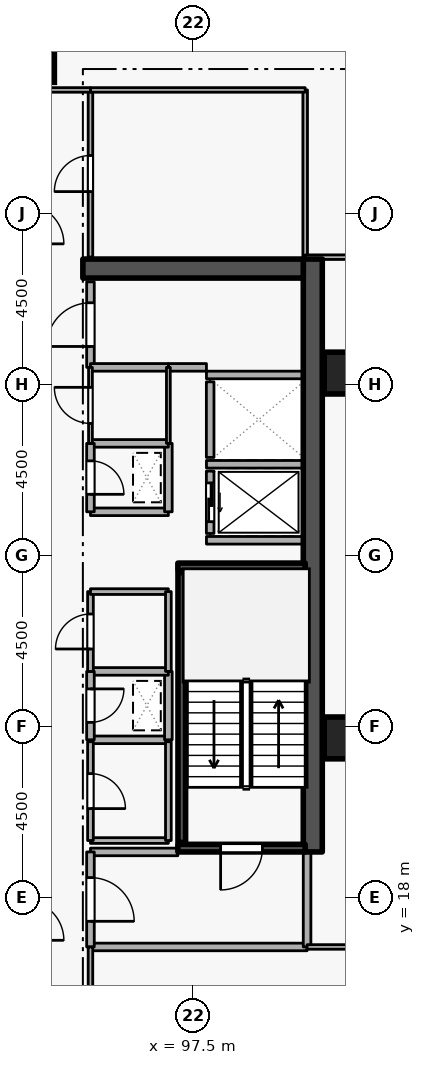
"""IFC4 building model, lengths in metres.
Left out: names, types, materials, properties, quantities, classifications, styles, units other than length and angle.
Written with IfcOpenShell. Run it as: python <this file> out.ifc"""

import sys

from ifc_helpers import new_model, si_unit, direction, frame, frame_2d, origin, origin_2d, place, context, subcontext, project, spatial, rectangle, extrude, element, fill, save


model = new_model("IFC4")
c1 = context("Model", 3, precision=1e-05, world=origin(), true_north=direction((0.0, 1.0)))
c2 = subcontext(c1, "Body", "Model", "MODEL_VIEW")
j1 = project(units=[si_unit("LENGTHUNIT", "METRE"), si_unit("PLANEANGLEUNIT", "RADIAN")], contexts=[c1])
p1 = place(None, origin())
s1 = spatial("IfcSite", under=j1, at=p1, CompositionType="ELEMENT")
p2 = place(p1, origin())
s2 = spatial("IfcBuilding", under=s1, at=p2, CompositionType="ELEMENT")
p3 = place(p2, frame((0.0, 0.0, 149.1)))
s3 = spatial("IfcBuildingStorey", under=s2, at=p3, CompositionType="ELEMENT", Elevation=149.1)
p4 = place(p3, frame((100.65, 19.2, 0.0), z_axis=(0.0, 0.0, 1.0), x_axis=(0.0, 1.0, 0.0)))
e1 = element("IfcWall", 1, at=p4, inside=s3, PredefinedType="SHEAR", context=c2, shape_type="SweptSolid", body=[
    extrude(rectangle(XDim=15.6, YDim=0.5, at=frame_2d((7.8, 0.0))), origin(), (0.0, 0.0, 1.0), 3.6),
])
p5 = place(p3, frame((94.6, 34.55, 0.0), z_axis=(0.0, 0.0, 1.0), x_axis=(1.0, 0.0, 0.0)))
e2 = element("IfcWall", 2, at=p5, inside=s3, PredefinedType="SHEAR", context=c2, shape_type="SweptSolid", body=[
    extrude(rectangle(XDim=5.8, YDim=0.5, at=frame_2d((2.9, 0.0))), origin(), (0.0, 0.0, 1.0), 3.6),
])
for number, where, z_axis, x_axis in (
    (3, (93.3, 40.0, 0.0), (0.0, 0.0, 1.0), (1.0, 0.0, 0.0)),
    (4, (101.5, 22.2, 0.0), (0.0, 0.0, 1.0), (1.0, 0.0, 0.0)),
    (5, (101.5, 31.8, 0.0), (0.0, 0.0, 1.0), (1.0, 0.0, 0.0)),
):
    element("IfcColumn", number, at=place(p3, frame(where, z_axis=z_axis, x_axis=x_axis)), inside=s3, PredefinedType="COLUMN", context=c2, shape_type="SweptSolid", body=[
        extrude(rectangle(XDim=1.1, YDim=1.1, at=origin_2d()), origin(), (0.0, 0.0, 1.0), 3.6),
    ])
p6 = place(p3, frame((97.95, 29.22, 0.0), z_axis=(0.0, 0.0, 1.0), x_axis=(0.0, -1.0, 0.0)))
e6 = element("IfcWall", 6, at=p6, inside=s3, PredefinedType="STANDARD", context=c2, shape_type="SweptSolid", body=[
    extrude(rectangle(XDim=1.64, YDim=0.2, at=frame_2d((0.82, 0.0))), origin(), (0.0, 0.0, 1.0), 3.3),
])
p7 = place(p6, frame((0.31, 0.0, 0.0)))
e7 = element("IfcOpeningElement", 7, at=p7, cuts=e6, PredefinedType="OPENING", context=c2, shape_type="SweptSolid", body=[
    extrude(rectangle(XDim=1.02, YDim=2.06, at=frame_2d((0.51, 1.03))), frame((0.0, 0.11, 0.0), z_axis=(0.0, -1.0, 0.0), x_axis=(1.0, 0.0, 0.0)), (0.0, 0.0, 1.0), 0.22),
])
p8 = place(p3, frame((97.95, 31.57, 0.0), z_axis=(0.0, 0.0, 1.0), x_axis=(0.0, -1.0, 0.0)))
e8 = element("IfcWall", 8, at=p8, inside=s3, PredefinedType="STANDARD", context=c2, shape_type="SweptSolid", body=[
    extrude(rectangle(XDim=1.99, YDim=0.2, at=frame_2d((0.995, 0.0))), origin(), (0.0, 0.0, 1.0), 3.3),
])
for number, where, z_axis, x_axis in (
    (9, (97.852, 29.4, 0.0), (0.0, 0.0, 1.0), (1.0, 0.0, 0.0)),
    (10, (97.852, 27.4, 0.0), (0.0, 0.0, 1.0), (1.0, 0.0, 0.0)),
    (11, (97.852, 31.75, 0.0), (0.0, 0.0, 1.0), (1.0, 0.0, 0.0)),
):
    element("IfcWall", number, at=place(p3, frame(where, z_axis=z_axis, x_axis=x_axis)), inside=s3, PredefinedType="STANDARD", context=c2, shape_type="SweptSolid", body=[
        extrude(rectangle(XDim=2.536, YDim=0.2, at=frame_2d((1.268, 0.0))), origin(), (0.0, 0.0, 1.0), 3.3),
    ])
p9 = place(p3, frame((100.45, 19.3, 0.0), z_axis=(0.0, 0.0, 1.0), x_axis=(-1.0, 0.0, 0.0)))
e12 = element("IfcWall", 12, at=p9, inside=s3, PredefinedType="SHEAR", context=c2, shape_type="SweptSolid", body=[
    extrude(rectangle(XDim=3.35, YDim=0.2, at=frame_2d((1.675, 0.0))), origin(), (0.0, 0.0, 1.0), 3.6),
])
p10 = place(p9, frame((1.125, 0.0, 0.0)))
e13 = element("IfcOpeningElement", 13, at=p10, cuts=e12, PredefinedType="OPENING", context=c2, shape_type="SweptSolid", body=[
    extrude(rectangle(XDim=1.1, YDim=2.1, at=frame_2d((0.55, 1.05))), frame((0.0, 0.11, 0.0), z_axis=(0.0, -1.0, 0.0), x_axis=(1.0, 0.0, 0.0)), (0.0, 0.0, 1.0), 0.22),
])
p11 = place(p3, frame((97.1, 26.7, 0.0), z_axis=(0.0, 0.0, 1.0), x_axis=(1.0, 0.0, 0.0)))
e14 = element("IfcWall", 14, at=p11, inside=s3, PredefinedType="SHEAR", context=c2, shape_type="SweptSolid", body=[
    extrude(rectangle(XDim=3.35, YDim=0.2, at=frame_2d((1.675, 0.0))), origin(), (0.0, 0.0, 1.0), 3.6),
])
p12 = place(p3, frame((97.203, 26.55, 0.0), z_axis=(0.0, 0.0, 1.0), x_axis=(0.0, -1.0, 0.0)))
e15 = element("IfcWall", 15, at=p12, inside=s3, PredefinedType="SHEAR", context=c2, shape_type="SweptSolid", body=[
    extrude(rectangle(XDim=7.1, YDim=0.2, at=frame_2d((3.55, 0.0))), origin(), (0.0, 0.0, 1.0), 3.6),
])
p13 = place(p3, frame((94.8, 16.7, 0.0), z_axis=(0.0, 0.0, 1.0), x_axis=(1.0, 0.0, 0.0)))
e16 = element("IfcWall", 16, at=p13, inside=s3, PredefinedType="STANDARD", context=c2, shape_type="SweptSolid", body=[
    extrude(rectangle(XDim=5.7, YDim=0.2, at=frame_2d((2.85, 0.0))), origin(), (0.0, 0.0, 1.0), 3.3),
])
p14 = place(p3, frame((100.5, 16.7, 0.0), z_axis=(0.0, 0.0, 1.0), x_axis=(0.0, 1.0, 0.0)))
e17 = element("IfcWall", 17, at=p14, inside=s3, PredefinedType="STANDARD", context=c2, shape_type="SweptSolid", body=[
    extrude(rectangle(XDim=2.5, YDim=0.2, at=frame_2d((1.25, 0.0))), origin(), (0.0, 0.0, 1.0), 3.3),
])
p15 = place(p3, frame((97.1, 19.2, 0.0), z_axis=(0.0, 0.0, 1.0), x_axis=(-1.0, 0.0, 0.0)))
e18 = element("IfcWall", 18, at=p15, inside=s3, PredefinedType="STANDARD", context=c2, shape_type="SweptSolid", body=[
    extrude(rectangle(XDim=2.3, YDim=0.2, at=frame_2d((1.15, 0.0))), origin(), (0.0, 0.0, 1.0), 2.505),
])
p16 = place(p3, frame((94.8, 19.2, 0.0), z_axis=(0.0, 0.0, 1.0), x_axis=(0.0, -1.0, 0.0)))
e19 = element("IfcWall", 19, at=p16, inside=s3, PredefinedType="STANDARD", context=c2, shape_type="SweptSolid", body=[
    extrude(rectangle(XDim=2.5, YDim=0.2, at=frame_2d((1.25, 0.0))), origin(), (0.0, 0.0, 1.0), 3.3),
])
p17 = place(p16, frame((0.675, 0.0, 0.0)))
e20 = element("IfcOpeningElement", 20, at=p17, cuts=e19, PredefinedType="OPENING", context=c2, shape_type="SweptSolid", body=[
    extrude(rectangle(XDim=1.15, YDim=2.1, at=frame_2d((0.575, 1.05))), frame((0.0, 0.11, 0.0), z_axis=(0.0, -1.0, 0.0), x_axis=(1.0, 0.0, 0.0)), (0.0, 0.0, 1.0), 0.22),
])
p18 = place(p3, frame((94.8, 28.15, 0.0), z_axis=(0.0, 0.0, 1.0), x_axis=(1.0, 0.0, 0.0)))
e21 = element("IfcWall", 21, at=p18, inside=s3, PredefinedType="STANDARD", context=c2, shape_type="SweptSolid", body=[
    extrude(rectangle(XDim=2.05, YDim=0.2, at=frame_2d((1.025, 0.0))), origin(), (0.0, 0.0, 1.0), 3.3),
])
p19 = place(p3, frame((96.85, 28.15, 0.0), z_axis=(0.0, 0.0, 1.0), x_axis=(0.0, 1.0, 0.0)))
e22 = element("IfcWall", 22, at=p19, inside=s3, PredefinedType="STANDARD", context=c2, shape_type="SweptSolid", body=[
    extrude(rectangle(XDim=1.8, YDim=0.2, at=frame_2d((0.9, 0.0))), origin(), (0.0, 0.0, 1.0), 3.3),
])
p20 = place(p3, frame((96.85, 29.95, 0.0), z_axis=(0.0, 0.0, 1.0), x_axis=(-1.0, 0.0, 0.0)))
e23 = element("IfcWall", 23, at=p20, inside=s3, PredefinedType="STANDARD", context=c2, shape_type="SweptSolid", body=[
    extrude(rectangle(XDim=2.05, YDim=0.2, at=frame_2d((1.025, 0.0))), origin(), (0.0, 0.0, 1.0), 3.3),
])
p21 = place(p3, frame((94.8, 29.95, 0.0), z_axis=(0.0, 0.0, 1.0), x_axis=(0.0, -1.0, 0.0)))
e24 = element("IfcWall", 24, at=p21, inside=s3, PredefinedType="STANDARD", context=c2, shape_type="SweptSolid", body=[
    extrude(rectangle(XDim=1.8, YDim=0.2, at=frame_2d((0.9, 0.0))), origin(), (0.0, 0.0, 1.0), 3.3),
])
p22 = place(p21, frame((0.46, 0.0, 0.0)))
e25 = element("IfcOpeningElement", 25, at=p22, cuts=e24, PredefinedType="OPENING", context=c2, shape_type="SweptSolid", body=[
    extrude(rectangle(XDim=0.88, YDim=2.04, at=frame_2d((0.44, 1.02))), frame((0.0, 0.11, 0.0), z_axis=(0.0, -1.0, 0.0), x_axis=(1.0, 0.0, 0.0)), (0.0, 0.0, 1.0), 0.22),
])
p23 = place(p3, frame((94.8, 22.15, 0.0), z_axis=(0.0, 0.0, 1.0), x_axis=(1.0, 0.0, 0.0)))
e26 = element("IfcWall", 26, at=p23, inside=s3, PredefinedType="STANDARD", context=c2, shape_type="SweptSolid", body=[
    extrude(rectangle(XDim=2.05, YDim=0.2, at=frame_2d((1.025, 0.0))), origin(), (0.0, 0.0, 1.0), 3.3),
])
p24 = place(p3, frame((96.85, 22.15, 0.0), z_axis=(0.0, 0.0, 1.0), x_axis=(0.0, 1.0, 0.0)))
e27 = element("IfcWall", 27, at=p24, inside=s3, PredefinedType="STANDARD", context=c2, shape_type="SweptSolid", body=[
    extrude(rectangle(XDim=1.8, YDim=0.2, at=frame_2d((0.9, 0.0))), origin(), (0.0, 0.0, 1.0), 3.3),
])
p25 = place(p3, frame((96.85, 23.95, 0.0), z_axis=(0.0, 0.0, 1.0), x_axis=(-1.0, 0.0, 0.0)))
e28 = element("IfcWall", 28, at=p25, inside=s3, PredefinedType="STANDARD", context=c2, shape_type="SweptSolid", body=[
    extrude(rectangle(XDim=2.05, YDim=0.2, at=frame_2d((1.025, 0.0))), origin(), (0.0, 0.0, 1.0), 3.3),
])
p26 = place(p3, frame((94.8, 23.95, 0.0), z_axis=(0.0, 0.0, 1.0), x_axis=(0.0, -1.0, 0.0)))
e29 = element("IfcWall", 29, at=p26, inside=s3, PredefinedType="STANDARD", context=c2, shape_type="SweptSolid", body=[
    extrude(rectangle(XDim=1.8, YDim=0.2, at=frame_2d((0.9, 0.0))), origin(), (0.0, 0.0, 1.0), 3.3),
])
p27 = place(p26, frame((0.46, 0.0, 0.0)))
e30 = element("IfcOpeningElement", 30, at=p27, cuts=e29, PredefinedType="OPENING", context=c2, shape_type="SweptSolid", body=[
    extrude(rectangle(XDim=0.88, YDim=2.04, at=frame_2d((0.44, 1.02))), frame((0.0, 0.11, 0.0), z_axis=(0.0, -1.0, 0.0), x_axis=(1.0, 0.0, 0.0)), (0.0, 0.0, 1.0), 0.22),
])
p28 = place(p3, frame((94.8, 31.95, 0.0), z_axis=(0.0, 0.0, 1.0), x_axis=(0.0, 1.0, 0.0)))
e31 = element("IfcWall", 31, at=p28, inside=s3, PredefinedType="STANDARD", context=c2, shape_type="SweptSolid", body=[
    extrude(rectangle(XDim=2.25, YDim=0.2, at=frame_2d((1.125, 0.0))), origin(), (0.0, 0.0, 1.0), 3.3),
])
p29 = place(p28, frame((0.55, 0.0, 0.0)))
e32 = element("IfcOpeningElement", 32, at=p29, cuts=e31, PredefinedType="OPENING", context=c2, shape_type="SweptSolid", body=[
    extrude(rectangle(XDim=1.15, YDim=2.1, at=frame_2d((0.575, 1.05))), frame((0.0, 0.11, 0.0), z_axis=(0.0, -1.0, 0.0), x_axis=(1.0, 0.0, 0.0)), (0.0, 0.0, 1.0), 0.22),
])
p30 = place(p3, frame((97.852, 31.95, 0.0), z_axis=(0.0, 0.0, 1.0), x_axis=(-1.0, 0.0, 0.0)))
e33 = element("IfcWall", 33, at=p30, inside=s3, PredefinedType="STANDARD", context=c2, shape_type="SweptSolid", body=[
    extrude(rectangle(XDim=1.002, YDim=0.2, at=frame_2d((0.501, 0.0))), origin(), (0.0, 0.0, 1.0), 3.3),
])
p31 = place(p3, frame((96.85, 31.95, 0.0), z_axis=(0.0, 0.0, 1.0), x_axis=(-1.0, 0.0, 0.0)))
e34 = element("IfcWall", 34, at=p31, inside=s3, PredefinedType="STANDARD", context=c2, shape_type="SweptSolid", body=[
    extrude(rectangle(XDim=2.05, YDim=0.2, at=frame_2d((1.025, 0.0))), origin(), (0.0, 0.0, 1.0), 3.3),
])
p32 = place(p3, frame((94.8, 19.5, 0.0), z_axis=(0.0, 0.0, 1.0), x_axis=(1.0, 0.0, 0.0)))
e35 = element("IfcWall", 35, at=p32, inside=s3, PredefinedType="PARTITIONING", context=c2, shape_type="SweptSolid", body=[
    extrude(rectangle(XDim=2.05, YDim=0.15, at=frame_2d((1.025, 0.0))), origin(), (0.0, 0.0, 1.0), 2.505),
])
p33 = place(p3, frame((96.85, 19.5, 0.0), z_axis=(0.0, 0.0, 1.0), x_axis=(0.0, 1.0, 0.0)))
e36 = element("IfcWall", 36, at=p33, inside=s3, PredefinedType="PARTITIONING", context=c2, shape_type="SweptSolid", body=[
    extrude(rectangle(XDim=2.6, YDim=0.15, at=frame_2d((1.3, 0.0))), origin(), (0.0, 0.0, 1.0), 3.3),
])
p34 = place(p3, frame((94.8, 22.1, 0.0), z_axis=(0.0, 0.0, 1.0), x_axis=(0.0, -1.0, 0.0)))
e37 = element("IfcWall", 37, at=p34, inside=s3, PredefinedType="PARTITIONING", context=c2, shape_type="SweptSolid", body=[
    extrude(rectangle(XDim=2.6, YDim=0.15, at=frame_2d((1.3, 0.0))), origin(), (0.0, 0.0, 1.0), 3.3),
])
p35 = place(p34, frame((0.84, 0.0, 0.0)))
e38 = element("IfcOpeningElement", 38, at=p35, cuts=e37, PredefinedType="OPENING", context=c2, shape_type="SweptSolid", body=[
    extrude(rectangle(XDim=0.92, YDim=2.08, at=frame_2d((0.46, 1.04))), frame((0.0, 0.085, 0.0), z_axis=(0.0, -1.0, 0.0), x_axis=(1.0, 0.0, 0.0)), (0.0, 0.0, 1.0), 0.17),
])
p36 = place(p3, frame((94.8, 23.95, 0.0), z_axis=(0.0, 0.0, 1.0), x_axis=(0.0, 1.0, 0.0)))
e39 = element("IfcWall", 39, at=p36, inside=s3, PredefinedType="PARTITIONING", context=c2, shape_type="SweptSolid", body=[
    extrude(rectangle(XDim=2.1, YDim=0.15, at=frame_2d((1.05, 0.0))), origin(), (0.0, 0.0, 1.0), 3.3),
])
p37 = place(p36, frame((0.59, 0.0, 0.0)))
e40 = element("IfcOpeningElement", 40, at=p37, cuts=e39, PredefinedType="OPENING", context=c2, shape_type="SweptSolid", body=[
    extrude(rectangle(XDim=0.92, YDim=2.08, at=frame_2d((0.46, 1.04))), frame((0.0, 0.085, 0.0), z_axis=(0.0, -1.0, 0.0), x_axis=(1.0, 0.0, 0.0)), (0.0, 0.0, 1.0), 0.17),
])
p38 = place(p3, frame((94.8, 26.05, 0.0), z_axis=(0.0, 0.0, 1.0), x_axis=(1.0, 0.0, 0.0)))
e41 = element("IfcWall", 41, at=p38, inside=s3, PredefinedType="PARTITIONING", context=c2, shape_type="SweptSolid", body=[
    extrude(rectangle(XDim=2.05, YDim=0.15, at=frame_2d((1.025, 0.0))), origin(), (0.0, 0.0, 1.0), 3.3),
])
p39 = place(p3, frame((96.85, 26.05, 0.0), z_axis=(0.0, 0.0, 1.0), x_axis=(0.0, -1.0, 0.0)))
e42 = element("IfcWall", 42, at=p39, inside=s3, PredefinedType="PARTITIONING", context=c2, shape_type="SweptSolid", body=[
    extrude(rectangle(XDim=2.1, YDim=0.15, at=frame_2d((1.05, 0.0))), origin(), (0.0, 0.0, 1.0), 3.3),
])
p40 = place(p3, frame((94.8, 29.95, 0.0), z_axis=(0.0, 0.0, 1.0), x_axis=(0.0, 1.0, 0.0)))
e43 = element("IfcWall", 43, at=p40, inside=s3, PredefinedType="PARTITIONING", context=c2, shape_type="SweptSolid", body=[
    extrude(rectangle(XDim=2.0, YDim=0.1, at=frame_2d((1.0, 0.0))), origin(), (0.0, 0.0, 1.0), 3.3),
])
p41 = place(p40, frame((0.525, 0.0, 0.0)))
e44 = element("IfcOpeningElement", 44, at=p41, cuts=e43, PredefinedType="OPENING", context=c2, shape_type="SweptSolid", body=[
    extrude(rectangle(XDim=0.95, YDim=2.1, at=frame_2d((0.475, 1.05))), frame((0.0, 0.06, 0.0), z_axis=(0.0, -1.0, 0.0), x_axis=(1.0, 0.0, 0.0)), (0.0, 0.0, 1.0), 0.12),
])
p42 = place(p3, frame((96.85, 31.95, 0.0), z_axis=(0.0, 0.0, 1.0), x_axis=(0.0, -1.0, 0.0)))
e45 = element("IfcWall", 45, at=p42, inside=s3, PredefinedType="PARTITIONING", context=c2, shape_type="SweptSolid", body=[
    extrude(rectangle(XDim=2.0, YDim=0.1, at=frame_2d((1.0, 0.0))), origin(), (0.0, 0.0, 1.0), 3.3),
])
p43 = place(p3, frame((100.45, 39.25, 0.0), z_axis=(0.0, 0.0, 1.0), x_axis=(0.0, -1.0, 0.0)))
e46 = element("IfcWall", 46, at=p43, inside=s3, PredefinedType="PARTITIONING", context=c2, shape_type="SweptSolid", body=[
    extrude(rectangle(XDim=4.4, YDim=0.12, at=frame_2d((2.2, 0.0))), origin(), (0.0, 0.0, 1.0), 3.3),
])
p44 = place(p3, frame((94.8, 34.85, 0.0), z_axis=(0.0, 0.0, 1.0), x_axis=(0.0, 1.0, 0.0)))
e47 = element("IfcWall", 47, at=p44, inside=s3, PredefinedType="PARTITIONING", context=c2, shape_type="SweptSolid", body=[
    extrude(rectangle(XDim=4.4, YDim=0.12, at=frame_2d((2.2, 0.0))), origin(), (0.0, 0.0, 1.0), 3.3),
])
p45 = place(p44, frame((1.725, 0.0, 0.0)))
e48 = element("IfcOpeningElement", 48, at=p45, cuts=e47, PredefinedType="OPENING", context=c2, shape_type="SweptSolid", body=[
    extrude(rectangle(XDim=0.95, YDim=2.1, at=frame_2d((0.475, 1.05))), frame((0.0, 0.07, 0.0), z_axis=(0.0, -1.0, 0.0), x_axis=(1.0, 0.0, 0.0)), (0.0, 0.0, 1.0), 0.14),
])
p46 = place(p3, frame((94.8, 39.25, 0.0), z_axis=(0.0, 0.0, 1.0), x_axis=(1.0, 0.0, 0.0)))
e49 = element("IfcWall", 49, at=p46, inside=s3, PredefinedType="PARTITIONING", context=c2, shape_type="SweptSolid", body=[
    extrude(rectangle(XDim=5.65, YDim=0.12, at=frame_2d((2.825, 0.0))), origin(), (0.0, 0.0, 1.0), 3.3),
])
p47 = place(p3, frame((94.8, 14.75, 0.0), z_axis=(0.0, 0.0, 1.0), x_axis=(0.0, 1.0, 0.0)))
e50 = element("IfcWall", 50, at=p47, inside=s3, PredefinedType="PARTITIONING", context=c2, shape_type="SweptSolid", body=[
    extrude(rectangle(XDim=1.95, YDim=0.12, at=frame_2d((0.975, 0.0))), origin(), (0.0, 0.0, 1.0), 3.3),
])
p48 = place(p3, frame((100.5, 16.7, 0.0), z_axis=(0.0, 0.0, 1.0), x_axis=(1.0, 0.0, 0.0)))
e51 = element("IfcWall", 51, at=p48, inside=s3, PredefinedType="PARTITIONING", context=c2, shape_type="SweptSolid", body=[
    extrude(rectangle(XDim=11.72, YDim=0.12, at=frame_2d((5.86, 0.0))), origin(), (0.0, 0.0, 1.0), 3.3),
])
p49 = place(p3, frame((94.8, 39.25, 0.0), z_axis=(0.0, 0.0, 1.0), x_axis=(-1.0, 0.0, 0.0)))
e52 = element("IfcWall", 52, at=p49, inside=s3, PredefinedType="PARTITIONING", context=c2, shape_type="SweptSolid", body=[
    extrude(rectangle(XDim=1.75, YDim=0.12, at=frame_2d((0.875, 0.0))), origin(), (0.0, 0.0, 1.0), 3.3),
])
p50 = place(p3, frame((112.22, 34.85, 0.0), z_axis=(0.0, 0.0, 1.0), x_axis=(-1.0, 0.0, 0.0)))
e53 = element("IfcWall", 53, at=p50, inside=s3, PredefinedType="PARTITIONING", context=c2, shape_type="SweptSolid", body=[
    extrude(rectangle(XDim=11.77, YDim=0.12, at=frame_2d((5.885, 0.0))), origin(), (0.0, 0.0, 1.0), 2.505),
])
p51 = place(p7, origin())
e54 = element("IfcDoor", 54, at=p51, inside=s3, OperationType="SLIDING_TO_LEFT", PredefinedType="DOOR", context=c2, shape_type="SweptSolid", body=[
    extrude(rectangle(XDim=1.02, YDim=2.06, at=frame_2d((0.51, 1.03))), frame((0.0, 0.025, 0.0), z_axis=(0.0, -1.0, 0.0), x_axis=(1.0, 0.0, 0.0)), (0.0, 0.0, 1.0), 0.05),
])
fill(e7, e54)
p52 = place(p10, origin())
e55 = element("IfcDoor", 55, at=p52, inside=s3, OperationType="SINGLE_SWING_RIGHT", PredefinedType="DOOR", context=c2, shape_type="SweptSolid", body=[
    extrude(rectangle(XDim=1.1, YDim=2.1, at=frame_2d((0.55, 1.05))), frame((0.0, 0.025, 0.0), z_axis=(0.0, -1.0, 0.0), x_axis=(1.0, 0.0, 0.0)), (0.0, 0.0, 1.0), 0.05),
])
fill(e13, e55)
p53 = place(p17, origin())
e56 = element("IfcDoor", 56, at=p53, inside=s3, OperationType="SINGLE_SWING_RIGHT", PredefinedType="DOOR", context=c2, shape_type="SweptSolid", body=[
    extrude(rectangle(XDim=1.15, YDim=2.1, at=frame_2d((0.575, 1.05))), frame((0.0, 0.025, 0.0), z_axis=(0.0, -1.0, 0.0), x_axis=(1.0, 0.0, 0.0)), (0.0, 0.0, 1.0), 0.05),
])
fill(e20, e56)
p54 = place(p22, origin())
e57 = element("IfcDoor", 57, at=p54, inside=s3, OperationType="SINGLE_SWING_RIGHT", PredefinedType="DOOR", context=c2, shape_type="SweptSolid", body=[
    extrude(rectangle(XDim=0.88, YDim=2.04, at=frame_2d((0.44, 1.02))), frame((0.0, 0.025, 0.0), z_axis=(0.0, -1.0, 0.0), x_axis=(1.0, 0.0, 0.0)), (0.0, 0.0, 1.0), 0.05),
])
fill(e25, e57)
p55 = place(p27, origin())
e58 = element("IfcDoor", 58, at=p55, inside=s3, OperationType="SINGLE_SWING_LEFT", PredefinedType="DOOR", context=c2, shape_type="SweptSolid", body=[
    extrude(rectangle(XDim=0.88, YDim=2.04, at=frame_2d((0.44, 1.02))), frame((0.0, 0.025, 0.0), z_axis=(0.0, -1.0, 0.0), x_axis=(1.0, 0.0, 0.0)), (0.0, 0.0, 1.0), 0.05),
])
fill(e30, e58)
p56 = place(p35, origin())
e59 = element("IfcDoor", 59, at=p56, inside=s3, OperationType="SINGLE_SWING_RIGHT", PredefinedType="DOOR", context=c2, shape_type="SweptSolid", body=[
    extrude(rectangle(XDim=0.92, YDim=2.08, at=frame_2d((0.46, 1.04))), frame((0.0, 0.025, 0.0), z_axis=(0.0, -1.0, 0.0), x_axis=(1.0, 0.0, 0.0)), (0.0, 0.0, 1.0), 0.05),
])
fill(e38, e59)
p57 = place(p37, origin())
e60 = element("IfcDoor", 60, at=p57, inside=s3, OperationType="SINGLE_SWING_LEFT", PredefinedType="DOOR", context=c2, shape_type="SweptSolid", body=[
    extrude(rectangle(XDim=0.92, YDim=2.08, at=frame_2d((0.46, 1.04))), frame((0.0, 0.025, 0.0), z_axis=(0.0, -1.0, 0.0), x_axis=(1.0, 0.0, 0.0)), (0.0, 0.0, 1.0), 0.05),
])
fill(e40, e60)
p58 = place(p41, origin())
e61 = element("IfcDoor", 61, at=p58, inside=s3, OperationType="SINGLE_SWING_RIGHT", PredefinedType="DOOR", context=c2, shape_type="SweptSolid", body=[
    extrude(rectangle(XDim=0.95, YDim=2.1, at=frame_2d((0.475, 1.05))), frame((0.0, 0.025, 0.0), z_axis=(0.0, -1.0, 0.0), x_axis=(1.0, 0.0, 0.0)), (0.0, 0.0, 1.0), 0.05),
])
fill(e44, e61)
p59 = place(p29, origin())
e62 = element("IfcDoor", 62, at=p59, inside=s3, OperationType="SINGLE_SWING_LEFT", PredefinedType="DOOR", context=c2, shape_type="SweptSolid", body=[
    extrude(rectangle(XDim=1.15, YDim=2.1, at=frame_2d((0.575, 1.05))), frame((0.0, 0.025, 0.0), z_axis=(0.0, -1.0, 0.0), x_axis=(1.0, 0.0, 0.0)), (0.0, 0.0, 1.0), 0.05),
])
fill(e32, e62)
p60 = place(p45, origin())
e63 = element("IfcDoor", 63, at=p60, inside=s3, OperationType="SINGLE_SWING_LEFT", PredefinedType="DOOR", context=c2, shape_type="SweptSolid", body=[
    extrude(rectangle(XDim=0.95, YDim=2.1, at=frame_2d((0.475, 1.05))), frame((0.0, 0.025, 0.0), z_axis=(0.0, -1.0, 0.0), x_axis=(1.0, 0.0, 0.0)), (0.0, 0.0, 1.0), 0.05),
])
fill(e48, e63)
save(model, sys.argv[1])
